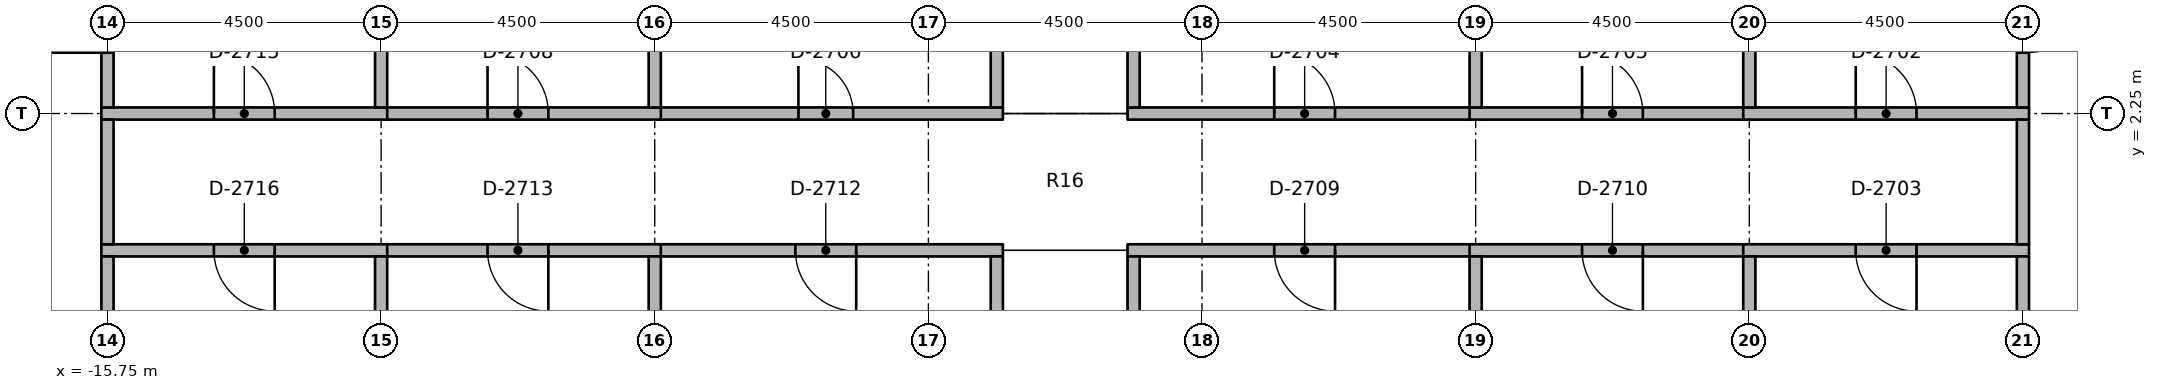
"""IFC4 building model, lengths in metres.
Left out: names, types, materials, properties, quantities, classifications, styles, units other than length and angle.
Written with IfcOpenShell. Run it as: python <this file> out.ifc"""

import sys

from ifc_helpers import new_model, si_unit, direction, frame, frame_2d, origin, place, context, subcontext, project, spatial, rectangle, extrude, element, fill, save


model = new_model("IFC4")
c1 = context("Model", 3, precision=1e-05, world=origin(), true_north=direction((0.0, 1.0)))
c2 = subcontext(c1, "Body", "Model", "MODEL_VIEW")
j1 = project(units=[si_unit("LENGTHUNIT", "METRE"), si_unit("PLANEANGLEUNIT", "RADIAN")], contexts=[c1])
p1 = place(None, origin())
s1 = spatial("IfcSite", under=j1, at=p1, CompositionType="ELEMENT")
p2 = place(p1, origin())
s2 = spatial("IfcBuilding", under=s1, at=p2, CompositionType="ELEMENT")
p3 = place(p2, frame((0.0, 0.0, 253.6)))
s3 = spatial("IfcBuildingStorey", under=s2, at=p3, CompositionType="ELEMENT", Elevation=253.6)
p4 = place(p3, frame((1.025, 2.25, 0.0), z_axis=(0.0, 0.0, 1.0), x_axis=(1.0, 0.0, 0.0)))
e1 = element("IfcWall", 1, at=p4, inside=s3, PredefinedType="PARTITIONING", context=c2, shape_type="SweptSolid", body=[
    extrude(rectangle(XDim=5.825, YDim=0.2, at=frame_2d((2.913, 0.0))), origin(), (0.0, 0.0, 1.0), 2.75),
])
p5 = place(p4, frame((2.413, 0.0, 0.0)))
e2 = element("IfcOpeningElement", 2, at=p5, cuts=e1, PredefinedType="OPENING", context=c2, shape_type="SweptSolid", body=[
    extrude(rectangle(XDim=1.0, YDim=2.1, at=frame_2d((0.5, 1.05))), frame((0.0, 0.11, 0.0), z_axis=(0.0, -1.0, 0.0), x_axis=(1.0, 0.0, 0.0)), (0.0, 0.0, 1.0), 0.22),
])
p6 = place(p3, frame((6.65, 2.25, 0.0), z_axis=(0.0, 0.0, 1.0), x_axis=(1.0, 0.0, 0.0)))
e3 = element("IfcWall", 3, at=p6, inside=s3, PredefinedType="PARTITIONING", context=c2, shape_type="SweptSolid", body=[
    extrude(rectangle(XDim=4.7, YDim=0.2, at=frame_2d((2.35, 0.0))), origin(), (0.0, 0.0, 1.0), 2.75),
])
p7 = place(p6, frame((1.85, 0.0, 0.0)))
e4 = element("IfcOpeningElement", 4, at=p7, cuts=e3, PredefinedType="OPENING", context=c2, shape_type="SweptSolid", body=[
    extrude(rectangle(XDim=1.0, YDim=2.1, at=frame_2d((0.5, 1.05))), frame((0.0, 0.11, 0.0), z_axis=(0.0, -1.0, 0.0), x_axis=(1.0, 0.0, 0.0)), (0.0, 0.0, 1.0), 0.22),
])
p8 = place(p3, frame((-6.85, 2.25, 0.0), z_axis=(0.0, 0.0, 1.0), x_axis=(1.0, 0.0, 0.0)))
e5 = element("IfcWall", 5, at=p8, inside=s3, PredefinedType="PARTITIONING", context=c2, shape_type="SweptSolid", body=[
    extrude(rectangle(XDim=5.825, YDim=0.2, at=frame_2d((2.913, 0.0))), origin(), (0.0, 0.0, 1.0), 2.75),
])
p9 = place(p8, frame((2.462, 0.0, 0.0)))
e6 = element("IfcOpeningElement", 6, at=p9, cuts=e5, PredefinedType="OPENING", context=c2, shape_type="SweptSolid", body=[
    extrude(rectangle(XDim=0.9, YDim=2.1, at=frame_2d((0.45, 1.05))), frame((0.0, 0.11, 0.0), z_axis=(0.0, -1.0, 0.0), x_axis=(1.0, 0.0, 0.0)), (0.0, 0.0, 1.0), 0.22),
])
p10 = place(p3, frame((-11.35, 2.25, 0.0), z_axis=(0.0, 0.0, 1.0), x_axis=(1.0, 0.0, 0.0)))
e7 = element("IfcWall", 7, at=p10, inside=s3, PredefinedType="PARTITIONING", context=c2, shape_type="SweptSolid", body=[
    extrude(rectangle(XDim=4.7, YDim=0.2, at=frame_2d((2.35, 0.0))), origin(), (0.0, 0.0, 1.0), 2.75),
])
p11 = place(p10, frame((1.85, 0.0, 0.0)))
e8 = element("IfcOpeningElement", 8, at=p11, cuts=e7, PredefinedType="OPENING", context=c2, shape_type="SweptSolid", body=[
    extrude(rectangle(XDim=1.0, YDim=2.1, at=frame_2d((0.5, 1.05))), frame((0.0, 0.11, 0.0), z_axis=(0.0, -1.0, 0.0), x_axis=(1.0, 0.0, 0.0)), (0.0, 0.0, 1.0), 0.22),
])
p12 = place(p3, frame((6.85, 0.0, 0.0), z_axis=(0.0, 0.0, 1.0), x_axis=(-1.0, 0.0, 0.0)))
e9 = element("IfcWall", 9, at=p12, inside=s3, PredefinedType="PARTITIONING", context=c2, shape_type="SweptSolid", body=[
    extrude(rectangle(XDim=5.825, YDim=0.2, at=frame_2d((2.913, 0.0))), origin(), (0.0, 0.0, 1.0), 2.75),
])
p13 = place(p12, frame((2.413, 0.0, 0.0)))
e10 = element("IfcOpeningElement", 10, at=p13, cuts=e9, PredefinedType="OPENING", context=c2, shape_type="SweptSolid", body=[
    extrude(rectangle(XDim=1.0, YDim=2.1, at=frame_2d((0.5, 1.05))), frame((0.0, 0.11, 0.0), z_axis=(0.0, -1.0, 0.0), x_axis=(1.0, 0.0, 0.0)), (0.0, 0.0, 1.0), 0.22),
])
p14 = place(p3, frame((11.35, 0.0, 0.0), z_axis=(0.0, 0.0, 1.0), x_axis=(-1.0, 0.0, 0.0)))
e11 = element("IfcWall", 11, at=p14, inside=s3, PredefinedType="PARTITIONING", context=c2, shape_type="SweptSolid", body=[
    extrude(rectangle(XDim=4.7, YDim=0.2, at=frame_2d((2.35, 0.0))), origin(), (0.0, 0.0, 1.0), 2.75),
])
p15 = place(p14, frame((1.85, 0.0, 0.0)))
e12 = element("IfcOpeningElement", 12, at=p15, cuts=e11, PredefinedType="OPENING", context=c2, shape_type="SweptSolid", body=[
    extrude(rectangle(XDim=1.0, YDim=2.1, at=frame_2d((0.5, 1.05))), frame((0.0, 0.11, 0.0), z_axis=(0.0, -1.0, 0.0), x_axis=(1.0, 0.0, 0.0)), (0.0, 0.0, 1.0), 0.22),
])
p16 = place(p3, frame((-1.025, 0.0, 0.0), z_axis=(0.0, 0.0, 1.0), x_axis=(-1.0, 0.0, 0.0)))
e13 = element("IfcWall", 13, at=p16, inside=s3, PredefinedType="PARTITIONING", context=c2, shape_type="SweptSolid", body=[
    extrude(rectangle(XDim=5.825, YDim=0.2, at=frame_2d((2.913, 0.0))), origin(), (0.0, 0.0, 1.0), 2.75),
])
p17 = place(p16, frame((2.413, 0.0, 0.0)))
e14 = element("IfcOpeningElement", 14, at=p17, cuts=e13, PredefinedType="OPENING", context=c2, shape_type="SweptSolid", body=[
    extrude(rectangle(XDim=1.0, YDim=2.1, at=frame_2d((0.5, 1.05))), frame((0.0, 0.11, 0.0), z_axis=(0.0, -1.0, 0.0), x_axis=(1.0, 0.0, 0.0)), (0.0, 0.0, 1.0), 0.22),
])
p18 = place(p3, frame((-6.65, 0.0, 0.0), z_axis=(0.0, 0.0, 1.0), x_axis=(-1.0, 0.0, 0.0)))
e15 = element("IfcWall", 15, at=p18, inside=s3, PredefinedType="PARTITIONING", context=c2, shape_type="SweptSolid", body=[
    extrude(rectangle(XDim=4.7, YDim=0.2, at=frame_2d((2.35, 0.0))), origin(), (0.0, 0.0, 1.0), 2.75),
])
p19 = place(p18, frame((1.85, 0.0, 0.0)))
e16 = element("IfcOpeningElement", 16, at=p19, cuts=e15, PredefinedType="OPENING", context=c2, shape_type="SweptSolid", body=[
    extrude(rectangle(XDim=1.0, YDim=2.1, at=frame_2d((0.5, 1.05))), frame((0.0, 0.11, 0.0), z_axis=(0.0, -1.0, 0.0), x_axis=(1.0, 0.0, 0.0)), (0.0, 0.0, 1.0), 0.22),
])
p20 = place(p3, frame((11.15, 2.25, 0.0), z_axis=(0.0, 0.0, 1.0), x_axis=(1.0, 0.0, 0.0)))
e17 = element("IfcWall", 17, at=p20, inside=s3, PredefinedType="PARTITIONING", context=c2, shape_type="SweptSolid", body=[
    extrude(rectangle(XDim=4.7, YDim=0.2, at=frame_2d((2.35, 0.0))), origin(), (0.0, 0.0, 1.0), 2.75),
])
p21 = place(p20, frame((1.85, 0.0, 0.0)))
e18 = element("IfcOpeningElement", 18, at=p21, cuts=e17, PredefinedType="OPENING", context=c2, shape_type="SweptSolid", body=[
    extrude(rectangle(XDim=1.0, YDim=2.1, at=frame_2d((0.5, 1.05))), frame((0.0, 0.11, 0.0), z_axis=(0.0, -1.0, 0.0), x_axis=(1.0, 0.0, 0.0)), (0.0, 0.0, 1.0), 0.22),
])
p22 = place(p3, frame((15.85, 0.0, 0.0), z_axis=(0.0, 0.0, 1.0), x_axis=(-1.0, 0.0, 0.0)))
e19 = element("IfcWall", 19, at=p22, inside=s3, PredefinedType="PARTITIONING", context=c2, shape_type="SweptSolid", body=[
    extrude(rectangle(XDim=4.7, YDim=0.2, at=frame_2d((2.35, 0.0))), origin(), (0.0, 0.0, 1.0), 2.75),
])
p23 = place(p22, frame((1.85, 0.0, 0.0)))
e20 = element("IfcOpeningElement", 20, at=p23, cuts=e19, PredefinedType="OPENING", context=c2, shape_type="SweptSolid", body=[
    extrude(rectangle(XDim=1.0, YDim=2.1, at=frame_2d((0.5, 1.05))), frame((0.0, 0.11, 0.0), z_axis=(0.0, -1.0, 0.0), x_axis=(1.0, 0.0, 0.0)), (0.0, 0.0, 1.0), 0.22),
])
p24 = place(p3, frame((15.75, 0.1, 0.0), z_axis=(0.0, 0.0, 1.0), x_axis=(0.0, 1.0, 0.0)))
e21 = element("IfcWall", 21, at=p24, inside=s3, PredefinedType="PARTITIONING", context=c2, shape_type="SweptSolid", body=[
    extrude(rectangle(XDim=2.05, YDim=0.2, at=frame_2d((1.025, 0.0))), origin(), (0.0, 0.0, 1.0), 2.75),
])
p25 = place(p3, frame((-15.85, 2.25, 0.0), z_axis=(0.0, 0.0, 1.0), x_axis=(1.0, 0.0, 0.0)))
e22 = element("IfcWall", 22, at=p25, inside=s3, PredefinedType="PARTITIONING", context=c2, shape_type="SweptSolid", body=[
    extrude(rectangle(XDim=4.7, YDim=0.2, at=frame_2d((2.35, 0.0))), origin(), (0.0, 0.0, 1.0), 2.75),
])
p26 = place(p25, frame((1.85, 0.0, 0.0)))
e23 = element("IfcOpeningElement", 23, at=p26, cuts=e22, PredefinedType="OPENING", context=c2, shape_type="SweptSolid", body=[
    extrude(rectangle(XDim=1.0, YDim=2.1, at=frame_2d((0.5, 1.05))), frame((0.0, 0.11, 0.0), z_axis=(0.0, -1.0, 0.0), x_axis=(1.0, 0.0, 0.0)), (0.0, 0.0, 1.0), 0.22),
])
p27 = place(p3, frame((-11.15, 0.0, 0.0), z_axis=(0.0, 0.0, 1.0), x_axis=(-1.0, 0.0, 0.0)))
e24 = element("IfcWall", 24, at=p27, inside=s3, PredefinedType="PARTITIONING", context=c2, shape_type="SweptSolid", body=[
    extrude(rectangle(XDim=4.7, YDim=0.2, at=frame_2d((2.35, 0.0))), origin(), (0.0, 0.0, 1.0), 2.75),
])
p28 = place(p27, frame((1.85, 0.0, 0.0)))
e25 = element("IfcOpeningElement", 25, at=p28, cuts=e24, PredefinedType="OPENING", context=c2, shape_type="SweptSolid", body=[
    extrude(rectangle(XDim=1.0, YDim=2.1, at=frame_2d((0.5, 1.05))), frame((0.0, 0.11, 0.0), z_axis=(0.0, -1.0, 0.0), x_axis=(1.0, 0.0, 0.0)), (0.0, 0.0, 1.0), 0.22),
])
p29 = place(p3, frame((-15.75, 0.1, 0.0), z_axis=(0.0, 0.0, 1.0), x_axis=(0.0, 1.0, 0.0)))
e26 = element("IfcWall", 26, at=p29, inside=s3, PredefinedType="PARTITIONING", context=c2, shape_type="SweptSolid", body=[
    extrude(rectangle(XDim=2.05, YDim=0.2, at=frame_2d((1.025, 0.0))), origin(), (0.0, 0.0, 1.0), 2.75),
])
p30 = place(p3, frame((1.125, 2.35, 0.0), z_axis=(0.0, 0.0, 1.0), x_axis=(0.0, 1.0, 0.0)))
e27 = element("IfcWall", 27, at=p30, inside=s3, PredefinedType="PARTITIONING", context=c2, shape_type="SweptSolid", body=[
    extrude(rectangle(XDim=4.3, YDim=0.2, at=frame_2d((2.15, 0.0))), origin(), (0.0, 0.0, 1.0), 2.75),
])
p31 = place(p3, frame((-1.125, 2.35, 0.0), z_axis=(0.0, 0.0, 1.0), x_axis=(0.0, 1.0, 0.0)))
e28 = element("IfcWall", 28, at=p31, inside=s3, PredefinedType="PARTITIONING", context=c2, shape_type="SweptSolid", body=[
    extrude(rectangle(XDim=2.05, YDim=0.2, at=frame_2d((1.025, 0.0))), origin(), (0.0, 0.0, 1.0), 2.75),
])
for number, where, z_axis, x_axis in (
    (29, (1.125, -6.65, 0.0), (0.0, 0.0, 1.0), (0.0, 1.0, 0.0)),
    (30, (-1.125, -6.65, 0.0), (0.0, 0.0, 1.0), (0.0, 1.0, 0.0)),
):
    element("IfcWall", number, at=place(p3, frame(where, z_axis=z_axis, x_axis=x_axis)), inside=s3, PredefinedType="PARTITIONING", context=c2, shape_type="SweptSolid", body=[
        extrude(rectangle(XDim=6.55, YDim=0.2, at=frame_2d((3.275, 0.0))), origin(), (0.0, 0.0, 1.0), 2.75),
    ])
p32 = place(p3, frame((6.75, 2.35, 0.0), z_axis=(0.0, 0.0, 1.0), x_axis=(0.0, 1.0, 0.0)))
e31 = element("IfcWall", 31, at=p32, inside=s3, PredefinedType="PARTITIONING", context=c2, shape_type="SweptSolid", body=[
    extrude(rectangle(XDim=4.3, YDim=0.2, at=frame_2d((2.15, 0.0))), origin(), (0.0, 0.0, 1.0), 2.75),
])
p33 = place(p3, frame((11.25, 2.35, 0.0), z_axis=(0.0, 0.0, 1.0), x_axis=(0.0, 1.0, 0.0)))
e32 = element("IfcWall", 32, at=p33, inside=s3, PredefinedType="PARTITIONING", context=c2, shape_type="SweptSolid", body=[
    extrude(rectangle(XDim=3.82, YDim=0.2, at=frame_2d((1.91, 0.0))), origin(), (0.0, 0.0, 1.0), 2.75),
])
p34 = place(p3, frame((-6.75, 2.35, 0.0), z_axis=(0.0, 0.0, 1.0), x_axis=(0.0, 1.0, 0.0)))
e33 = element("IfcWall", 33, at=p34, inside=s3, PredefinedType="PARTITIONING", context=c2, shape_type="SweptSolid", body=[
    extrude(rectangle(XDim=2.05, YDim=0.2, at=frame_2d((1.025, 0.0))), origin(), (0.0, 0.0, 1.0), 2.75),
])
p35 = place(p3, frame((-11.25, 2.35, 0.0), z_axis=(0.0, 0.0, 1.0), x_axis=(0.0, 1.0, 0.0)))
e34 = element("IfcWall", 34, at=p35, inside=s3, PredefinedType="PARTITIONING", context=c2, shape_type="SweptSolid", body=[
    extrude(rectangle(XDim=3.82, YDim=0.2, at=frame_2d((1.91, 0.0))), origin(), (0.0, 0.0, 1.0), 2.75),
])
for number, where, z_axis, x_axis in (
    (35, (6.75, -6.65, 0.0), (0.0, 0.0, 1.0), (0.0, 1.0, 0.0)),
    (36, (11.25, -6.65, 0.0), (0.0, 0.0, 1.0), (0.0, 1.0, 0.0)),
    (37, (-6.75, -6.65, 0.0), (0.0, 0.0, 1.0), (0.0, 1.0, 0.0)),
):
    element("IfcWall", number, at=place(p3, frame(where, z_axis=z_axis, x_axis=x_axis)), inside=s3, PredefinedType="PARTITIONING", context=c2, shape_type="SweptSolid", body=[
        extrude(rectangle(XDim=6.55, YDim=0.2, at=frame_2d((3.275, 0.0))), origin(), (0.0, 0.0, 1.0), 2.75),
    ])
p36 = place(p3, frame((-11.25, -6.17, 0.0), z_axis=(0.0, 0.0, 1.0), x_axis=(0.0, 1.0, 0.0)))
e38 = element("IfcWall", 38, at=p36, inside=s3, PredefinedType="PARTITIONING", context=c2, shape_type="SweptSolid", body=[
    extrude(rectangle(XDim=6.07, YDim=0.2, at=frame_2d((3.035, 0.0))), origin(), (0.0, 0.0, 1.0), 2.75),
])
p37 = place(p3, frame((15.75, 5.95, 0.0), z_axis=(0.0, 0.0, 1.0), x_axis=(0.0, -1.0, 0.0)))
e39 = element("IfcWall", 39, at=p37, inside=s3, PredefinedType="PARTITIONING", context=c2, shape_type="SweptSolid", body=[
    extrude(rectangle(XDim=3.6, YDim=0.2, at=frame_2d((1.8, 0.0))), origin(), (0.0, 0.0, 1.0), 2.75),
])
p38 = place(p37, frame((0.9, 0.0, 0.0)))
e40 = element("IfcOpeningElement", 40, at=p38, cuts=e39, PredefinedType="OPENING", context=c2, shape_type="SweptSolid", body=[
    extrude(rectangle(XDim=1.8, YDim=2.1, at=frame_2d((0.9, 1.05))), frame((0.0, 0.11, 0.0), z_axis=(0.0, -1.0, 0.0), x_axis=(1.0, 0.0, 0.0)), (0.0, 0.0, 1.0), 0.22),
])
p39 = place(p3, frame((15.75, -5.95, 0.0), z_axis=(0.0, 0.0, 1.0), x_axis=(0.0, 1.0, 0.0)))
e41 = element("IfcWall", 41, at=p39, inside=s3, PredefinedType="PARTITIONING", context=c2, shape_type="SweptSolid", body=[
    extrude(rectangle(XDim=5.85, YDim=0.2, at=frame_2d((2.925, 0.0))), origin(), (0.0, 0.0, 1.0), 2.75),
])
p40 = place(p3, frame((-15.75, 2.35, 0.0), z_axis=(0.0, 0.0, 1.0), x_axis=(0.0, 1.0, 0.0)))
e42 = element("IfcWall", 42, at=p40, inside=s3, PredefinedType="PARTITIONING", context=c2, shape_type="SweptSolid", body=[
    extrude(rectangle(XDim=3.6, YDim=0.2, at=frame_2d((1.8, 0.0))), origin(), (0.0, 0.0, 1.0), 2.75),
])
p41 = place(p40, frame((0.9, 0.0, 0.0)))
e43 = element("IfcOpeningElement", 43, at=p41, cuts=e42, PredefinedType="OPENING", context=c2, shape_type="SweptSolid", body=[
    extrude(rectangle(XDim=1.8, YDim=2.1, at=frame_2d((0.9, 1.05))), frame((0.0, 0.11, 0.0), z_axis=(0.0, -1.0, 0.0), x_axis=(1.0, 0.0, 0.0)), (0.0, 0.0, 1.0), 0.22),
])
p42 = place(p3, frame((-15.75, -5.95, 0.0), z_axis=(0.0, 0.0, 1.0), x_axis=(0.0, 1.0, 0.0)))
e44 = element("IfcWall", 44, at=p42, inside=s3, PredefinedType="PARTITIONING", context=c2, shape_type="SweptSolid", body=[
    extrude(rectangle(XDim=5.85, YDim=0.2, at=frame_2d((2.925, 0.0))), origin(), (0.0, 0.0, 1.0), 2.75),
])
p43 = place(p21, origin())
e45 = element("IfcDoor", 45, at=p43, inside=s3, OperationType="SINGLE_SWING_RIGHT", PredefinedType="DOOR", context=c2, shape_type="SweptSolid", body=[
    extrude(rectangle(XDim=1.0, YDim=2.1, at=frame_2d((0.5, 1.05))), frame((0.0, 0.025, 0.0), z_axis=(0.0, -1.0, 0.0), x_axis=(1.0, 0.0, 0.0)), (0.0, 0.0, 1.0), 0.05),
])
fill(e18, e45)
p44 = place(p23, origin())
e46 = element("IfcDoor", 46, at=p44, inside=s3, OperationType="SINGLE_SWING_RIGHT", PredefinedType="DOOR", context=c2, shape_type="SweptSolid", body=[
    extrude(rectangle(XDim=1.0, YDim=2.1, at=frame_2d((0.5, 1.05))), frame((0.0, 0.025, 0.0), z_axis=(0.0, -1.0, 0.0), x_axis=(1.0, 0.0, 0.0)), (0.0, 0.0, 1.0), 0.05),
])
fill(e20, e46)
p45 = place(p5, origin())
e47 = element("IfcDoor", 47, at=p45, inside=s3, OperationType="SINGLE_SWING_RIGHT", PredefinedType="DOOR", context=c2, shape_type="SweptSolid", body=[
    extrude(rectangle(XDim=1.0, YDim=2.1, at=frame_2d((0.5, 1.05))), frame((0.0, 0.025, 0.0), z_axis=(0.0, -1.0, 0.0), x_axis=(1.0, 0.0, 0.0)), (0.0, 0.0, 1.0), 0.05),
])
fill(e2, e47)
p46 = place(p7, origin())
e48 = element("IfcDoor", 48, at=p46, inside=s3, OperationType="SINGLE_SWING_RIGHT", PredefinedType="DOOR", context=c2, shape_type="SweptSolid", body=[
    extrude(rectangle(XDim=1.0, YDim=2.1, at=frame_2d((0.5, 1.05))), frame((0.0, 0.025, 0.0), z_axis=(0.0, -1.0, 0.0), x_axis=(1.0, 0.0, 0.0)), (0.0, 0.0, 1.0), 0.05),
])
fill(e4, e48)
p47 = place(p9, origin())
e49 = element("IfcDoor", 49, at=p47, inside=s3, OperationType="SINGLE_SWING_RIGHT", PredefinedType="DOOR", context=c2, shape_type="SweptSolid", body=[
    extrude(rectangle(XDim=0.9, YDim=2.1, at=frame_2d((0.45, 1.05))), frame((0.0, 0.025, 0.0), z_axis=(0.0, -1.0, 0.0), x_axis=(1.0, 0.0, 0.0)), (0.0, 0.0, 1.0), 0.05),
])
fill(e6, e49)
p48 = place(p11, origin())
e50 = element("IfcDoor", 50, at=p48, inside=s3, OperationType="SINGLE_SWING_RIGHT", PredefinedType="DOOR", context=c2, shape_type="SweptSolid", body=[
    extrude(rectangle(XDim=1.0, YDim=2.1, at=frame_2d((0.5, 1.05))), frame((0.0, 0.025, 0.0), z_axis=(0.0, -1.0, 0.0), x_axis=(1.0, 0.0, 0.0)), (0.0, 0.0, 1.0), 0.05),
])
fill(e8, e50)
p49 = place(p13, origin())
e51 = element("IfcDoor", 51, at=p49, inside=s3, OperationType="SINGLE_SWING_RIGHT", PredefinedType="DOOR", context=c2, shape_type="SweptSolid", body=[
    extrude(rectangle(XDim=1.0, YDim=2.1, at=frame_2d((0.5, 1.05))), frame((0.0, 0.025, 0.0), z_axis=(0.0, -1.0, 0.0), x_axis=(1.0, 0.0, 0.0)), (0.0, 0.0, 1.0), 0.05),
])
fill(e10, e51)
p50 = place(p15, origin())
e52 = element("IfcDoor", 52, at=p50, inside=s3, OperationType="SINGLE_SWING_RIGHT", PredefinedType="DOOR", context=c2, shape_type="SweptSolid", body=[
    extrude(rectangle(XDim=1.0, YDim=2.1, at=frame_2d((0.5, 1.05))), frame((0.0, 0.025, 0.0), z_axis=(0.0, -1.0, 0.0), x_axis=(1.0, 0.0, 0.0)), (0.0, 0.0, 1.0), 0.05),
])
fill(e12, e52)
p51 = place(p17, origin())
e53 = element("IfcDoor", 53, at=p51, inside=s3, OperationType="SINGLE_SWING_RIGHT", PredefinedType="DOOR", context=c2, shape_type="SweptSolid", body=[
    extrude(rectangle(XDim=1.0, YDim=2.1, at=frame_2d((0.5, 1.05))), frame((0.0, 0.025, 0.0), z_axis=(0.0, -1.0, 0.0), x_axis=(1.0, 0.0, 0.0)), (0.0, 0.0, 1.0), 0.05),
])
fill(e14, e53)
p52 = place(p19, origin())
e54 = element("IfcDoor", 54, at=p52, inside=s3, OperationType="SINGLE_SWING_RIGHT", PredefinedType="DOOR", context=c2, shape_type="SweptSolid", body=[
    extrude(rectangle(XDim=1.0, YDim=2.1, at=frame_2d((0.5, 1.05))), frame((0.0, 0.025, 0.0), z_axis=(0.0, -1.0, 0.0), x_axis=(1.0, 0.0, 0.0)), (0.0, 0.0, 1.0), 0.05),
])
fill(e16, e54)
p53 = place(p41, origin())
e55 = element("IfcDoor", 55, at=p53, inside=s3, OperationType="DOUBLE_DOOR_SINGLE_SWING", PredefinedType="DOOR", context=c2, shape_type="SweptSolid", body=[
    extrude(rectangle(XDim=1.8, YDim=2.1, at=frame_2d((0.9, 1.05))), frame((0.0, 0.025, 0.0), z_axis=(0.0, -1.0, 0.0), x_axis=(1.0, 0.0, 0.0)), (0.0, 0.0, 1.0), 0.05),
])
fill(e43, e55)
p54 = place(p26, origin())
e56 = element("IfcDoor", 56, at=p54, inside=s3, OperationType="SINGLE_SWING_RIGHT", PredefinedType="DOOR", context=c2, shape_type="SweptSolid", body=[
    extrude(rectangle(XDim=1.0, YDim=2.1, at=frame_2d((0.5, 1.05))), frame((0.0, 0.025, 0.0), z_axis=(0.0, -1.0, 0.0), x_axis=(1.0, 0.0, 0.0)), (0.0, 0.0, 1.0), 0.05),
])
fill(e23, e56)
p55 = place(p28, origin())
e57 = element("IfcDoor", 57, at=p55, inside=s3, OperationType="SINGLE_SWING_RIGHT", PredefinedType="DOOR", context=c2, shape_type="SweptSolid", body=[
    extrude(rectangle(XDim=1.0, YDim=2.1, at=frame_2d((0.5, 1.05))), frame((0.0, 0.025, 0.0), z_axis=(0.0, -1.0, 0.0), x_axis=(1.0, 0.0, 0.0)), (0.0, 0.0, 1.0), 0.05),
])
fill(e25, e57)
save(model, sys.argv[1])
